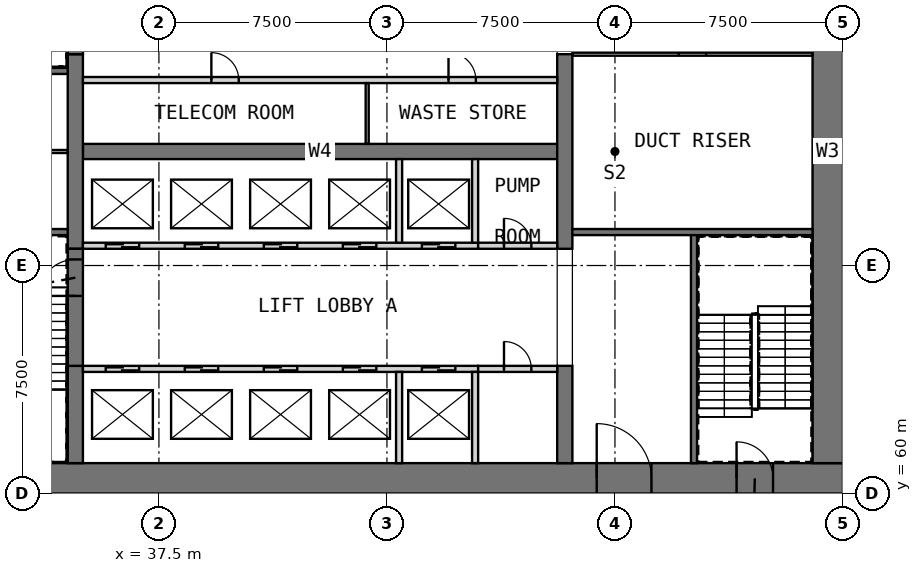
"""IFC4 building model, lengths in metres.
Left out: names, types, materials, properties, quantities, classifications, styles, units other than length and angle.
Written with IfcOpenShell. Run it as: python <this file> out.ifc"""

import sys

from ifc_helpers import new_model, si_unit, direction, frame, frame_2d, origin, place, context, subcontext, project, spatial, rectangle, extrude, element, fill, save


model = new_model("IFC4")
c1 = context("Model", 3, precision=1e-05, world=origin(), true_north=direction((0.0, 1.0)))
c2 = subcontext(c1, "Body", "Model", "MODEL_VIEW")
j1 = project(units=[si_unit("LENGTHUNIT", "METRE"), si_unit("PLANEANGLEUNIT", "RADIAN")], contexts=[c1])
p1 = place(None, origin())
s1 = spatial("IfcSite", under=j1, at=p1, CompositionType="ELEMENT")
p2 = place(p1, origin())
s2 = spatial("IfcBuilding", under=s1, at=p2, CompositionType="ELEMENT")
p3 = place(p2, origin())
s3 = spatial("IfcBuildingStorey", under=s2, at=p3, CompositionType="ELEMENT", Elevation=0.0)
p4 = place(p3, frame((30.0, 60.5, 0.0), z_axis=(0.0, 0.0, 1.0), x_axis=(1.0, 0.0, 0.0)))
e1 = element("IfcWall", 1, at=p4, inside=s3, PredefinedType="SHEAR", context=c2, shape_type="SweptSolid", body=[
    extrude(rectangle(XDim=30.0, YDim=1.0, at=frame_2d((15.0, 0.0))), origin(), (0.0, 0.0, 1.0), 8.0),
])
p5 = place(p4, frame((21.9, 0.0, 0.0)))
e2 = element("IfcOpeningElement", 2, at=p5, cuts=e1, PredefinedType="OPENING", context=c2, shape_type="SweptSolid", body=[
    extrude(rectangle(XDim=1.8, YDim=2.1, at=frame_2d((0.9, 1.05))), frame((0.0, 0.51, 0.0), z_axis=(0.0, -1.0, 0.0), x_axis=(1.0, 0.0, 0.0)), (0.0, 0.0, 1.0), 1.02),
])
p6 = place(p4, frame((26.5, 0.0, 0.0)))
e3 = element("IfcOpeningElement", 3, at=p6, cuts=e1, PredefinedType="OPENING", context=c2, shape_type="SweptSolid", body=[
    extrude(rectangle(XDim=1.2, YDim=2.1, at=frame_2d((0.6, 1.05))), frame((0.0, 0.51, 0.0), z_axis=(0.0, -1.0, 0.0), x_axis=(1.0, 0.0, 0.0)), (0.0, 0.0, 1.0), 1.02),
])
p7 = place(p3, frame((59.5, 61.0, 0.0), z_axis=(0.0, 0.0, 1.0), x_axis=(0.0, 1.0, 0.0)))
e4 = element("IfcWall", 4, at=p7, inside=s3, PredefinedType="SHEAR", context=c2, shape_type="SweptSolid", body=[
    extrude(rectangle(XDim=20.5, YDim=1.0, at=frame_2d((10.25, 0.0))), origin(), (0.0, 0.0, 1.0), 8.0),
])
p8 = place(p7, frame((14.5, 0.0, 0.0)))
e5 = element("IfcOpeningElement", 5, at=p8, cuts=e4, PredefinedType="OPENING", context=c2, shape_type="SweptSolid", body=[
    extrude(rectangle(XDim=1.8, YDim=2.1, at=frame_2d((0.9, 1.05))), frame((0.0, 0.51, 0.0), z_axis=(0.0, -1.0, 0.0), x_axis=(1.0, 0.0, 0.0)), (0.0, 0.0, 1.0), 1.02),
])
p9 = place(p3, frame((35.0, 71.25, 0.0), z_axis=(0.0, 0.0, 1.0), x_axis=(1.0, 0.0, 0.0)))
e6 = element("IfcWall", 6, at=p9, inside=s3, PredefinedType="SHEAR", context=c2, shape_type="SweptSolid", body=[
    extrude(rectangle(XDim=15.6, YDim=0.5, at=frame_2d((7.8, 0.0))), origin(), (0.0, 0.0, 1.0), 8.0),
])
p10 = place(p3, frame((34.75, 61.0, 0.0), z_axis=(0.0, 0.0, 1.0), x_axis=(0.0, 1.0, 0.0)))
e7 = element("IfcWall", 7, at=p10, inside=s3, PredefinedType="SHEAR", context=c2, shape_type="SweptSolid", body=[
    extrude(rectangle(XDim=3.2, YDim=0.5, at=frame_2d((1.6, 0.0))), origin(), (0.0, 0.0, 1.0), 8.0),
])
p11 = place(p3, frame((34.75, 68.05, 0.0), z_axis=(0.0, 0.0, 1.0), x_axis=(0.0, 1.0, 0.0)))
e8 = element("IfcWall", 8, at=p11, inside=s3, PredefinedType="SHEAR", context=c2, shape_type="SweptSolid", body=[
    extrude(rectangle(XDim=6.4, YDim=0.5, at=frame_2d((3.2, 0.0))), origin(), (0.0, 0.0, 1.0), 8.0),
])
p12 = place(p3, frame((50.85, 61.0, 0.0), z_axis=(0.0, 0.0, 1.0), x_axis=(0.0, 1.0, 0.0)))
e9 = element("IfcWall", 9, at=p12, inside=s3, PredefinedType="SHEAR", context=c2, shape_type="SweptSolid", body=[
    extrude(rectangle(XDim=3.2, YDim=0.5, at=frame_2d((1.6, 0.0))), origin(), (0.0, 0.0, 1.0), 8.0),
])
p13 = place(p3, frame((50.85, 68.05, 0.0), z_axis=(0.0, 0.0, 1.0), x_axis=(0.0, 1.0, 0.0)))
e10 = element("IfcWall", 10, at=p13, inside=s3, PredefinedType="SHEAR", context=c2, shape_type="SweptSolid", body=[
    extrude(rectangle(XDim=6.4, YDim=0.5, at=frame_2d((3.2, 0.0))), origin(), (0.0, 0.0, 1.0), 8.0),
])
p14 = place(p3, frame((35.0, 64.1, 0.0), z_axis=(0.0, 0.0, 1.0), x_axis=(1.0, 0.0, 0.0)))
e11 = element("IfcWall", 11, at=p14, inside=s3, PredefinedType="SOLIDWALL", context=c2, shape_type="SweptSolid", body=[
    extrude(rectangle(XDim=13.0, YDim=0.2, at=frame_2d((6.5, 0.0))), origin(), (0.0, 0.0, 1.0), 8.0),
])
p15 = place(p14, frame((0.75, 0.0, 0.0)))
e12 = element("IfcOpeningElement", 12, at=p15, cuts=e11, PredefinedType="OPENING", context=c2, shape_type="SweptSolid", body=[
    extrude(rectangle(XDim=1.1, YDim=2.1, at=frame_2d((0.55, 1.05))), frame((0.0, 0.11, 0.0), z_axis=(0.0, -1.0, 0.0), x_axis=(1.0, 0.0, 0.0)), (0.0, 0.0, 1.0), 0.22),
])
p16 = place(p14, frame((3.35, 0.0, 0.0)))
e13 = element("IfcOpeningElement", 13, at=p16, cuts=e11, PredefinedType="OPENING", context=c2, shape_type="SweptSolid", body=[
    extrude(rectangle(XDim=1.1, YDim=2.1, at=frame_2d((0.55, 1.05))), frame((0.0, 0.11, 0.0), z_axis=(0.0, -1.0, 0.0), x_axis=(1.0, 0.0, 0.0)), (0.0, 0.0, 1.0), 0.22),
])
p17 = place(p14, frame((5.95, 0.0, 0.0)))
e14 = element("IfcOpeningElement", 14, at=p17, cuts=e11, PredefinedType="OPENING", context=c2, shape_type="SweptSolid", body=[
    extrude(rectangle(XDim=1.1, YDim=2.1, at=frame_2d((0.55, 1.05))), frame((0.0, 0.11, 0.0), z_axis=(0.0, -1.0, 0.0), x_axis=(1.0, 0.0, 0.0)), (0.0, 0.0, 1.0), 0.22),
])
p18 = place(p14, frame((8.55, 0.0, 0.0)))
e15 = element("IfcOpeningElement", 15, at=p18, cuts=e11, PredefinedType="OPENING", context=c2, shape_type="SweptSolid", body=[
    extrude(rectangle(XDim=1.1, YDim=2.1, at=frame_2d((0.55, 1.05))), frame((0.0, 0.11, 0.0), z_axis=(0.0, -1.0, 0.0), x_axis=(1.0, 0.0, 0.0)), (0.0, 0.0, 1.0), 0.22),
])
p19 = place(p14, frame((11.15, 0.0, 0.0)))
e16 = element("IfcOpeningElement", 16, at=p19, cuts=e11, PredefinedType="OPENING", context=c2, shape_type="SweptSolid", body=[
    extrude(rectangle(XDim=1.1, YDim=2.1, at=frame_2d((0.55, 1.05))), frame((0.0, 0.11, 0.0), z_axis=(0.0, -1.0, 0.0), x_axis=(1.0, 0.0, 0.0)), (0.0, 0.0, 1.0), 0.22),
])
for number, where, z_axis, x_axis in (
    (17, (45.4, 61.0, 0.0), (0.0, 0.0, 1.0), (0.0, 1.0, 0.0)),
    (18, (47.9, 61.0, 0.0), (0.0, 0.0, 1.0), (0.0, 1.0, 0.0)),
):
    element("IfcWall", number, at=place(p3, frame(where, z_axis=z_axis, x_axis=x_axis)), inside=s3, PredefinedType="SOLIDWALL", context=c2, shape_type="SweptSolid", body=[
        extrude(rectangle(XDim=3.0, YDim=0.2, at=frame_2d((1.5, 0.0))), origin(), (0.0, 0.0, 1.0), 8.0),
    ])
p20 = place(p3, frame((48.0, 64.1, 0.0), z_axis=(0.0, 0.0, 1.0), x_axis=(1.0, 0.0, 0.0)))
e19 = element("IfcWall", 19, at=p20, inside=s3, PredefinedType="PARTITIONING", context=c2, shape_type="SweptSolid", body=[
    extrude(rectangle(XDim=2.6, YDim=0.2, at=frame_2d((1.3, 0.0))), origin(), (0.0, 0.0, 1.0), 7.7),
])
p21 = place(p20, frame((0.85, 0.0, 0.0)))
e20 = element("IfcOpeningElement", 20, at=p21, cuts=e19, PredefinedType="OPENING", context=c2, shape_type="SweptSolid", body=[
    extrude(rectangle(XDim=0.9, YDim=2.1, at=frame_2d((0.45, 1.05))), frame((0.0, 0.11, 0.0), z_axis=(0.0, -1.0, 0.0), x_axis=(1.0, 0.0, 0.0)), (0.0, 0.0, 1.0), 0.22),
])
p22 = place(p3, frame((35.0, 68.15, 0.0), z_axis=(0.0, 0.0, 1.0), x_axis=(1.0, 0.0, 0.0)))
e21 = element("IfcWall", 21, at=p22, inside=s3, PredefinedType="SOLIDWALL", context=c2, shape_type="SweptSolid", body=[
    extrude(rectangle(XDim=13.0, YDim=0.2, at=frame_2d((6.5, 0.0))), origin(), (0.0, 0.0, 1.0), 8.0),
])
p23 = place(p22, frame((0.75, 0.0, 0.0)))
e22 = element("IfcOpeningElement", 22, at=p23, cuts=e21, PredefinedType="OPENING", context=c2, shape_type="SweptSolid", body=[
    extrude(rectangle(XDim=1.1, YDim=2.1, at=frame_2d((0.55, 1.05))), frame((0.0, 0.11, 0.0), z_axis=(0.0, -1.0, 0.0), x_axis=(1.0, 0.0, 0.0)), (0.0, 0.0, 1.0), 0.22),
])
p24 = place(p22, frame((3.35, 0.0, 0.0)))
e23 = element("IfcOpeningElement", 23, at=p24, cuts=e21, PredefinedType="OPENING", context=c2, shape_type="SweptSolid", body=[
    extrude(rectangle(XDim=1.1, YDim=2.1, at=frame_2d((0.55, 1.05))), frame((0.0, 0.11, 0.0), z_axis=(0.0, -1.0, 0.0), x_axis=(1.0, 0.0, 0.0)), (0.0, 0.0, 1.0), 0.22),
])
p25 = place(p22, frame((5.95, 0.0, 0.0)))
e24 = element("IfcOpeningElement", 24, at=p25, cuts=e21, PredefinedType="OPENING", context=c2, shape_type="SweptSolid", body=[
    extrude(rectangle(XDim=1.1, YDim=2.1, at=frame_2d((0.55, 1.05))), frame((0.0, 0.11, 0.0), z_axis=(0.0, -1.0, 0.0), x_axis=(1.0, 0.0, 0.0)), (0.0, 0.0, 1.0), 0.22),
])
p26 = place(p22, frame((8.55, 0.0, 0.0)))
e25 = element("IfcOpeningElement", 25, at=p26, cuts=e21, PredefinedType="OPENING", context=c2, shape_type="SweptSolid", body=[
    extrude(rectangle(XDim=1.1, YDim=2.1, at=frame_2d((0.55, 1.05))), frame((0.0, 0.11, 0.0), z_axis=(0.0, -1.0, 0.0), x_axis=(1.0, 0.0, 0.0)), (0.0, 0.0, 1.0), 0.22),
])
p27 = place(p22, frame((11.15, 0.0, 0.0)))
e26 = element("IfcOpeningElement", 26, at=p27, cuts=e21, PredefinedType="OPENING", context=c2, shape_type="SweptSolid", body=[
    extrude(rectangle(XDim=1.1, YDim=2.1, at=frame_2d((0.55, 1.05))), frame((0.0, 0.11, 0.0), z_axis=(0.0, -1.0, 0.0), x_axis=(1.0, 0.0, 0.0)), (0.0, 0.0, 1.0), 0.22),
])
for number, where, z_axis, x_axis in (
    (27, (45.4, 68.25, 0.0), (0.0, 0.0, 1.0), (0.0, 1.0, 0.0)),
    (28, (47.9, 68.25, 0.0), (0.0, 0.0, 1.0), (0.0, 1.0, 0.0)),
):
    element("IfcWall", number, at=place(p3, frame(where, z_axis=z_axis, x_axis=x_axis)), inside=s3, PredefinedType="SOLIDWALL", context=c2, shape_type="SweptSolid", body=[
        extrude(rectangle(XDim=2.75, YDim=0.2, at=frame_2d((1.375, 0.0))), origin(), (0.0, 0.0, 1.0), 8.0),
    ])
p28 = place(p3, frame((48.0, 68.15, 0.0), z_axis=(0.0, 0.0, 1.0), x_axis=(1.0, 0.0, 0.0)))
e29 = element("IfcWall", 29, at=p28, inside=s3, PredefinedType="PARTITIONING", context=c2, shape_type="SweptSolid", body=[
    extrude(rectangle(XDim=2.6, YDim=0.2, at=frame_2d((1.3, 0.0))), origin(), (0.0, 0.0, 1.0), 7.7),
])
p29 = place(p28, frame((0.85, 0.0, 0.0)))
e30 = element("IfcOpeningElement", 30, at=p29, cuts=e29, PredefinedType="OPENING", context=c2, shape_type="SweptSolid", body=[
    extrude(rectangle(XDim=0.9, YDim=2.1, at=frame_2d((0.45, 1.05))), frame((0.0, 0.11, 0.0), z_axis=(0.0, -1.0, 0.0), x_axis=(1.0, 0.0, 0.0)), (0.0, 0.0, 1.0), 0.22),
])
p30 = place(p3, frame((35.0, 73.6, 0.0), z_axis=(0.0, 0.0, 1.0), x_axis=(1.0, 0.0, 0.0)))
e31 = element("IfcWall", 31, at=p30, inside=s3, PredefinedType="PARTITIONING", context=c2, shape_type="SweptSolid", body=[
    extrude(rectangle(XDim=15.6, YDim=0.2, at=frame_2d((7.8, 0.0))), origin(), (0.0, 0.0, 1.0), 7.7),
])
p31 = place(p30, frame((4.225, 0.0, 0.0)))
e32 = element("IfcOpeningElement", 32, at=p31, cuts=e31, PredefinedType="OPENING", context=c2, shape_type="SweptSolid", body=[
    extrude(rectangle(XDim=0.9, YDim=2.1, at=frame_2d((0.45, 1.05))), frame((0.0, 0.11, 0.0), z_axis=(0.0, -1.0, 0.0), x_axis=(1.0, 0.0, 0.0)), (0.0, 0.0, 1.0), 0.22),
])
p32 = place(p30, frame((12.025, 0.0, 0.0)))
e33 = element("IfcOpeningElement", 33, at=p32, cuts=e31, PredefinedType="OPENING", context=c2, shape_type="SweptSolid", body=[
    extrude(rectangle(XDim=0.9, YDim=2.1, at=frame_2d((0.45, 1.05))), frame((0.0, 0.11, 0.0), z_axis=(0.0, -1.0, 0.0), x_axis=(1.0, 0.0, 0.0)), (0.0, 0.0, 1.0), 0.22),
])
p33 = place(p3, frame((44.35, 71.5, 0.0), z_axis=(0.0, 0.0, 1.0), x_axis=(0.0, 1.0, 0.0)))
e34 = element("IfcWall", 34, at=p33, inside=s3, PredefinedType="PARTITIONING", context=c2, shape_type="SweptSolid", body=[
    extrude(rectangle(XDim=2.0, YDim=0.1, at=frame_2d((1.0, 0.0))), origin(), (0.0, 0.0, 1.0), 7.7),
])
p34 = place(p3, frame((34.75, 64.2, 0.0), z_axis=(0.0, 0.0, 1.0), x_axis=(0.0, 1.0, 0.0)))
e35 = element("IfcWall", 35, at=p34, inside=s3, PredefinedType="SOLIDWALL", context=c2, shape_type="SweptSolid", body=[
    extrude(rectangle(XDim=3.85, YDim=0.5, at=frame_2d((1.925, 0.0))), origin(), (0.0, 0.0, 1.0), 6.8),
])
p35 = place(p34, frame((2.3, 0.0, 0.0)))
e36 = element("IfcOpeningElement", 36, at=p35, cuts=e35, PredefinedType="OPENING", context=c2, shape_type="SweptSolid", body=[
    extrude(rectangle(XDim=1.2, YDim=2.1, at=frame_2d((0.6, 1.05))), frame((0.0, 0.26, 0.0), z_axis=(0.0, -1.0, 0.0), x_axis=(1.0, 0.0, 0.0)), (0.0, 0.0, 1.0), 0.52),
])
p36 = place(p3, frame((34.75, 74.45, 0.0), z_axis=(0.0, 0.0, 1.0), x_axis=(0.0, 1.0, 0.0)))
e37 = element("IfcWall", 37, at=p36, inside=s3, PredefinedType="SOLIDWALL", context=c2, shape_type="SweptSolid", body=[
    extrude(rectangle(XDim=3.85, YDim=0.5, at=frame_2d((1.925, 0.0))), origin(), (0.0, 0.0, 1.0), 6.8),
])
p37 = place(p36, frame((1.0, 0.0, 0.0)))
e38 = element("IfcOpeningElement", 38, at=p37, cuts=e37, PredefinedType="OPENING", context=c2, shape_type="SweptSolid", body=[
    extrude(rectangle(XDim=1.2, YDim=2.1, at=frame_2d((0.6, 1.05))), frame((0.0, 0.26, 0.0), z_axis=(0.0, -1.0, 0.0), x_axis=(1.0, 0.0, 0.0)), (0.0, 0.0, 1.0), 0.52),
])
p38 = place(p3, frame((31.0, 68.6, 0.0), z_axis=(0.0, 0.0, 1.0), x_axis=(1.0, 0.0, 0.0)))
e39 = element("IfcWall", 39, at=p38, inside=s3, PredefinedType="SOLIDWALL", context=c2, shape_type="SweptSolid", body=[
    extrude(rectangle(XDim=3.5, YDim=0.2, at=frame_2d((1.75, 0.0))), origin(), (0.0, 0.0, 1.0), 7.7),
])
p39 = place(p38, frame((1.3, 0.0, 0.0)))
e40 = element("IfcOpeningElement", 40, at=p39, cuts=e39, PredefinedType="OPENING", context=c2, shape_type="SweptSolid", body=[
    extrude(rectangle(XDim=0.9, YDim=2.1, at=frame_2d((0.45, 1.05))), frame((0.0, 0.11, 0.0), z_axis=(0.0, -1.0, 0.0), x_axis=(1.0, 0.0, 0.0)), (0.0, 0.0, 1.0), 0.22),
])
p40 = place(p3, frame((31.0, 73.9, 0.0), z_axis=(0.0, 0.0, 1.0), x_axis=(1.0, 0.0, 0.0)))
e41 = element("IfcWall", 41, at=p40, inside=s3, PredefinedType="SOLIDWALL", context=c2, shape_type="SweptSolid", body=[
    extrude(rectangle(XDim=3.5, YDim=0.2, at=frame_2d((1.75, 0.0))), origin(), (0.0, 0.0, 1.0), 7.7),
])
p41 = place(p40, frame((1.3, 0.0, 0.0)))
e42 = element("IfcOpeningElement", 42, at=p41, cuts=e41, PredefinedType="OPENING", context=c2, shape_type="SweptSolid", body=[
    extrude(rectangle(XDim=0.9, YDim=2.1, at=frame_2d((0.45, 1.05))), frame((0.0, 0.11, 0.0), z_axis=(0.0, -1.0, 0.0), x_axis=(1.0, 0.0, 0.0)), (0.0, 0.0, 1.0), 0.22),
])
p42 = place(p3, frame((55.1, 61.0, 0.0), z_axis=(0.0, 0.0, 1.0), x_axis=(0.0, 1.0, 0.0)))
e43 = element("IfcWall", 43, at=p42, inside=s3, PredefinedType="SOLIDWALL", context=c2, shape_type="SweptSolid", body=[
    extrude(rectangle(XDim=7.6, YDim=0.2, at=frame_2d((3.8, 0.0))), origin(), (0.0, 0.0, 1.0), 7.7),
])
p43 = place(p3, frame((51.1, 68.6, 0.0), z_axis=(0.0, 0.0, 1.0), x_axis=(1.0, 0.0, 0.0)))
e44 = element("IfcWall", 44, at=p43, inside=s3, PredefinedType="SOLIDWALL", context=c2, shape_type="SweptSolid", body=[
    extrude(rectangle(XDim=7.9, YDim=0.2, at=frame_2d((3.95, 0.0))), origin(), (0.0, 0.0, 1.0), 7.7),
])
p44 = place(p3, frame((31.0, 71.25, 0.0), z_axis=(0.0, 0.0, 1.0), x_axis=(1.0, 0.0, 0.0)))
e45 = element("IfcWall", 45, at=p44, inside=s3, PredefinedType="PARTITIONING", context=c2, shape_type="SweptSolid", body=[
    extrude(rectangle(XDim=3.5, YDim=0.1, at=frame_2d((1.75, 0.0))), origin(), (0.0, 0.0, 1.0), 7.7),
])
p45 = place(p3, frame((51.1, 74.45, 0.0), z_axis=(0.0, 0.0, 1.0), x_axis=(1.0, 0.0, 0.0)))
e46 = element("IfcWall", 46, at=p45, inside=s3, PredefinedType="PARTITIONING", context=c2, shape_type="SweptSolid", body=[
    extrude(rectangle(XDim=7.9, YDim=0.1, at=frame_2d((3.95, 0.0))), origin(), (0.0, 0.0, 1.0), 7.7),
])
p46 = place(p45, frame((3.5, 0.0, 0.0)))
e47 = element("IfcOpeningElement", 47, at=p46, cuts=e46, PredefinedType="OPENING", context=c2, shape_type="SweptSolid", body=[
    extrude(rectangle(XDim=0.9, YDim=2.1, at=frame_2d((0.45, 1.05))), frame((0.0, 0.06, 0.0), z_axis=(0.0, -1.0, 0.0), x_axis=(1.0, 0.0, 0.0)), (0.0, 0.0, 1.0), 0.12),
])
p47 = place(p15, origin())
e48 = element("IfcDoor", 48, at=p47, inside=s3, OperationType="DOUBLE_DOOR_SLIDING", PredefinedType="DOOR", context=c2, shape_type="SweptSolid", body=[
    extrude(rectangle(XDim=1.1, YDim=2.1, at=frame_2d((0.55, 1.05))), frame((0.0, 0.025, 0.0), z_axis=(0.0, -1.0, 0.0), x_axis=(1.0, 0.0, 0.0)), (0.0, 0.0, 1.0), 0.05),
])
fill(e12, e48)
p48 = place(p16, origin())
e49 = element("IfcDoor", 49, at=p48, inside=s3, OperationType="DOUBLE_DOOR_SLIDING", PredefinedType="DOOR", context=c2, shape_type="SweptSolid", body=[
    extrude(rectangle(XDim=1.1, YDim=2.1, at=frame_2d((0.55, 1.05))), frame((0.0, 0.025, 0.0), z_axis=(0.0, -1.0, 0.0), x_axis=(1.0, 0.0, 0.0)), (0.0, 0.0, 1.0), 0.05),
])
fill(e13, e49)
p49 = place(p17, origin())
e50 = element("IfcDoor", 50, at=p49, inside=s3, OperationType="DOUBLE_DOOR_SLIDING", PredefinedType="DOOR", context=c2, shape_type="SweptSolid", body=[
    extrude(rectangle(XDim=1.1, YDim=2.1, at=frame_2d((0.55, 1.05))), frame((0.0, 0.025, 0.0), z_axis=(0.0, -1.0, 0.0), x_axis=(1.0, 0.0, 0.0)), (0.0, 0.0, 1.0), 0.05),
])
fill(e14, e50)
p50 = place(p18, origin())
e51 = element("IfcDoor", 51, at=p50, inside=s3, OperationType="DOUBLE_DOOR_SLIDING", PredefinedType="DOOR", context=c2, shape_type="SweptSolid", body=[
    extrude(rectangle(XDim=1.1, YDim=2.1, at=frame_2d((0.55, 1.05))), frame((0.0, 0.025, 0.0), z_axis=(0.0, -1.0, 0.0), x_axis=(1.0, 0.0, 0.0)), (0.0, 0.0, 1.0), 0.05),
])
fill(e15, e51)
p51 = place(p19, origin())
e52 = element("IfcDoor", 52, at=p51, inside=s3, OperationType="DOUBLE_DOOR_SLIDING", PredefinedType="DOOR", context=c2, shape_type="SweptSolid", body=[
    extrude(rectangle(XDim=1.1, YDim=2.1, at=frame_2d((0.55, 1.05))), frame((0.0, 0.025, 0.0), z_axis=(0.0, -1.0, 0.0), x_axis=(1.0, 0.0, 0.0)), (0.0, 0.0, 1.0), 0.05),
])
fill(e16, e52)
p52 = place(p21, origin())
e53 = element("IfcDoor", 53, at=p52, inside=s3, OperationType="SINGLE_SWING_RIGHT", PredefinedType="DOOR", context=c2, shape_type="SweptSolid", body=[
    extrude(rectangle(XDim=0.9, YDim=2.1, at=frame_2d((0.45, 1.05))), frame((0.0, 0.025, 0.0), z_axis=(0.0, -1.0, 0.0), x_axis=(1.0, 0.0, 0.0)), (0.0, 0.0, 1.0), 0.05),
])
fill(e20, e53)
p53 = place(p23, origin())
e54 = element("IfcDoor", 54, at=p53, inside=s3, OperationType="DOUBLE_DOOR_SLIDING", PredefinedType="DOOR", context=c2, shape_type="SweptSolid", body=[
    extrude(rectangle(XDim=1.1, YDim=2.1, at=frame_2d((0.55, 1.05))), frame((0.0, 0.025, 0.0), z_axis=(0.0, -1.0, 0.0), x_axis=(1.0, 0.0, 0.0)), (0.0, 0.0, 1.0), 0.05),
])
fill(e22, e54)
p54 = place(p24, origin())
e55 = element("IfcDoor", 55, at=p54, inside=s3, OperationType="DOUBLE_DOOR_SLIDING", PredefinedType="DOOR", context=c2, shape_type="SweptSolid", body=[
    extrude(rectangle(XDim=1.1, YDim=2.1, at=frame_2d((0.55, 1.05))), frame((0.0, 0.025, 0.0), z_axis=(0.0, -1.0, 0.0), x_axis=(1.0, 0.0, 0.0)), (0.0, 0.0, 1.0), 0.05),
])
fill(e23, e55)
p55 = place(p25, origin())
e56 = element("IfcDoor", 56, at=p55, inside=s3, OperationType="DOUBLE_DOOR_SLIDING", PredefinedType="DOOR", context=c2, shape_type="SweptSolid", body=[
    extrude(rectangle(XDim=1.1, YDim=2.1, at=frame_2d((0.55, 1.05))), frame((0.0, 0.025, 0.0), z_axis=(0.0, -1.0, 0.0), x_axis=(1.0, 0.0, 0.0)), (0.0, 0.0, 1.0), 0.05),
])
fill(e24, e56)
p56 = place(p26, origin())
e57 = element("IfcDoor", 57, at=p56, inside=s3, OperationType="DOUBLE_DOOR_SLIDING", PredefinedType="DOOR", context=c2, shape_type="SweptSolid", body=[
    extrude(rectangle(XDim=1.1, YDim=2.1, at=frame_2d((0.55, 1.05))), frame((0.0, 0.025, 0.0), z_axis=(0.0, -1.0, 0.0), x_axis=(1.0, 0.0, 0.0)), (0.0, 0.0, 1.0), 0.05),
])
fill(e25, e57)
p57 = place(p27, origin())
e58 = element("IfcDoor", 58, at=p57, inside=s3, OperationType="DOUBLE_DOOR_SLIDING", PredefinedType="DOOR", context=c2, shape_type="SweptSolid", body=[
    extrude(rectangle(XDim=1.1, YDim=2.1, at=frame_2d((0.55, 1.05))), frame((0.0, 0.025, 0.0), z_axis=(0.0, -1.0, 0.0), x_axis=(1.0, 0.0, 0.0)), (0.0, 0.0, 1.0), 0.05),
])
fill(e26, e58)
p58 = place(p29, origin())
e59 = element("IfcDoor", 59, at=p58, inside=s3, OperationType="SINGLE_SWING_RIGHT", PredefinedType="DOOR", context=c2, shape_type="SweptSolid", body=[
    extrude(rectangle(XDim=0.9, YDim=2.1, at=frame_2d((0.45, 1.05))), frame((0.0, 0.025, 0.0), z_axis=(0.0, -1.0, 0.0), x_axis=(1.0, 0.0, 0.0)), (0.0, 0.0, 1.0), 0.05),
])
fill(e30, e59)
p59 = place(p31, origin())
e60 = element("IfcDoor", 60, at=p59, inside=s3, OperationType="SINGLE_SWING_RIGHT", PredefinedType="DOOR", context=c2, shape_type="SweptSolid", body=[
    extrude(rectangle(XDim=0.9, YDim=2.1, at=frame_2d((0.45, 1.05))), frame((0.0, 0.025, 0.0), z_axis=(0.0, -1.0, 0.0), x_axis=(1.0, 0.0, 0.0)), (0.0, 0.0, 1.0), 0.05),
])
fill(e32, e60)
p60 = place(p32, origin())
e61 = element("IfcDoor", 61, at=p60, inside=s3, OperationType="SINGLE_SWING_LEFT", PredefinedType="DOOR", context=c2, shape_type="SweptSolid", body=[
    extrude(rectangle(XDim=0.9, YDim=2.1, at=frame_2d((0.45, 1.05))), frame((0.0, 0.025, 0.0), z_axis=(0.0, -1.0, 0.0), x_axis=(1.0, 0.0, 0.0)), (0.0, 0.0, 1.0), 0.05),
])
fill(e33, e61)
p61 = place(p5, origin())
e62 = element("IfcDoor", 62, at=p61, inside=s3, OperationType="DOUBLE_DOOR_SINGLE_SWING", PredefinedType="DOOR", context=c2, shape_type="SweptSolid", body=[
    extrude(rectangle(XDim=1.8, YDim=2.1, at=frame_2d((0.9, 1.05))), frame((0.0, 0.025, 0.0), z_axis=(0.0, -1.0, 0.0), x_axis=(1.0, 0.0, 0.0)), (0.0, 0.0, 1.0), 0.05),
])
fill(e2, e62)
p62 = place(p35, origin())
e63 = element("IfcDoor", 63, at=p62, inside=s3, OperationType="SINGLE_SWING_LEFT", PredefinedType="DOOR", context=c2, shape_type="SweptSolid", body=[
    extrude(rectangle(XDim=1.2, YDim=2.1, at=frame_2d((0.6, 1.05))), frame((0.0, 0.025, 0.0), z_axis=(0.0, -1.0, 0.0), x_axis=(1.0, 0.0, 0.0)), (0.0, 0.0, 1.0), 0.05),
])
fill(e36, e63)
p63 = place(p6, origin())
e64 = element("IfcDoor", 64, at=p63, inside=s3, OperationType="SINGLE_SWING_LEFT", PredefinedType="DOOR", context=c2, shape_type="SweptSolid", body=[
    extrude(rectangle(XDim=1.2, YDim=2.1, at=frame_2d((0.6, 1.05))), frame((0.0, 0.025, 0.0), z_axis=(0.0, -1.0, 0.0), x_axis=(1.0, 0.0, 0.0)), (0.0, 0.0, 1.0), 0.05),
])
fill(e3, e64)
p64 = place(p46, origin())
e65 = element("IfcDoor", 65, at=p64, inside=s3, OperationType="SINGLE_SWING_RIGHT", PredefinedType="DOOR", context=c2, shape_type="SweptSolid", body=[
    extrude(rectangle(XDim=0.9, YDim=2.1, at=frame_2d((0.45, 1.05))), frame((0.0, 0.025, 0.0), z_axis=(0.0, -1.0, 0.0), x_axis=(1.0, 0.0, 0.0)), (0.0, 0.0, 1.0), 0.05),
])
fill(e47, e65)
save(model, sys.argv[1])
